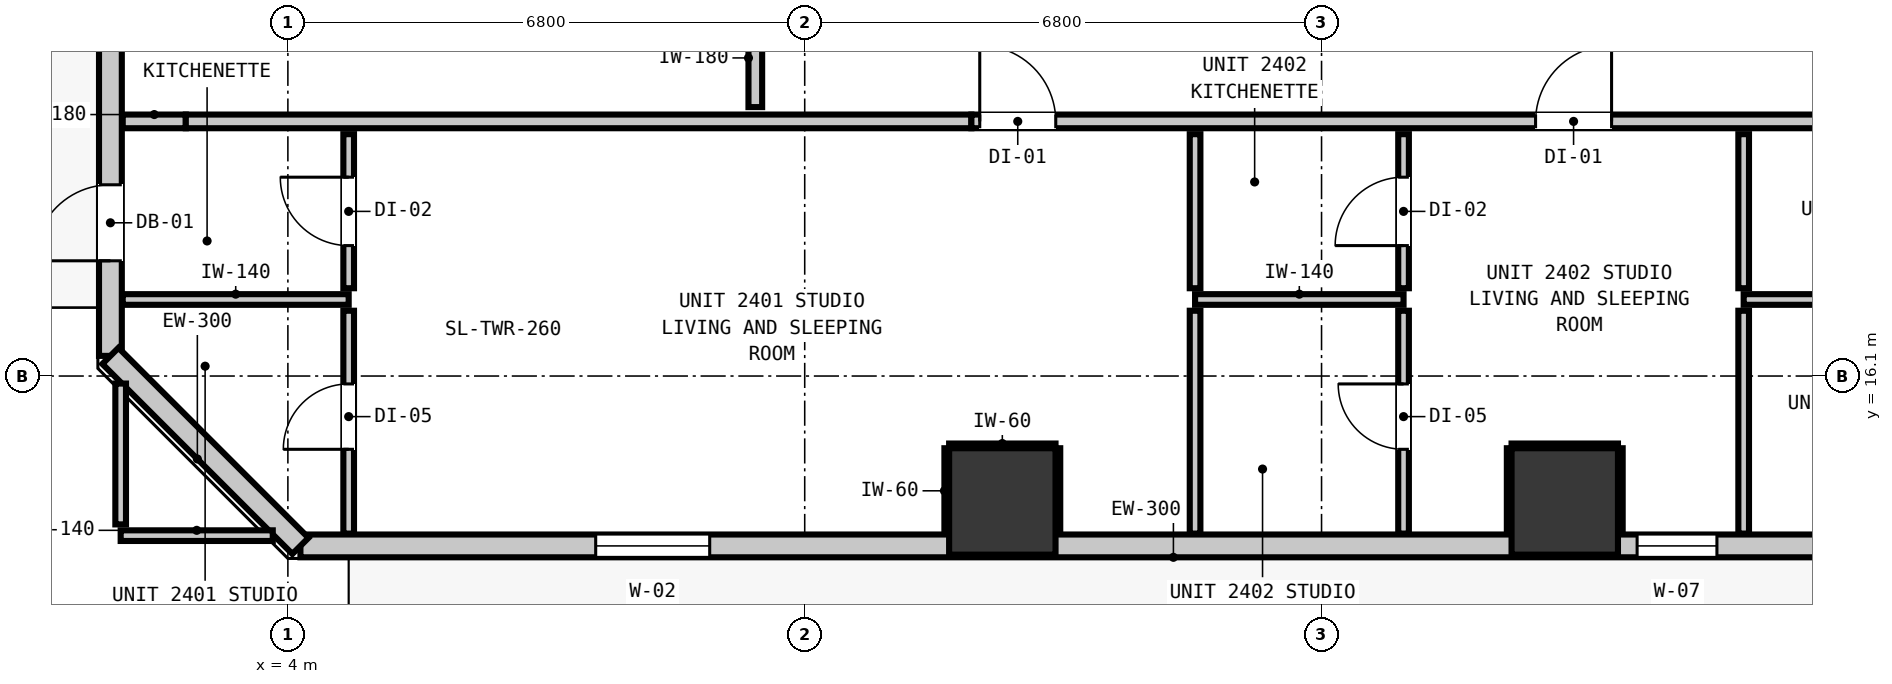
"""IFC4 building model, lengths in metres.
Left out: names, types, materials, properties, quantities, classifications, styles, units other than length and angle.
Written with IfcOpenShell. Run it as: python <this file> out.ifc"""

import sys

from ifc_helpers import new_model, si_unit, direction, frame, frame_2d, origin, origin_2d, place, context, subcontext, project, spatial, rectangle, extrude, element, fill, save


model = new_model("IFC4")
c1 = context("Model", 3, precision=1e-05, world=origin(), true_north=direction((0.0, 1.0)))
c2 = subcontext(c1, "Body", "Model", "MODEL_VIEW")
j1 = project(units=[si_unit("LENGTHUNIT", "METRE"), si_unit("PLANEANGLEUNIT", "RADIAN")], contexts=[c1])
p1 = place(None, origin())
s1 = spatial("IfcSite", under=j1, at=p1, CompositionType="ELEMENT")
p2 = place(p1, origin())
s2 = spatial("IfcBuilding", under=s1, at=p2, CompositionType="ELEMENT")
p3 = place(p2, frame((0.0, 0.0, 85.08)))
s3 = spatial("IfcBuildingStorey", under=s2, at=p3, CompositionType="ELEMENT", Elevation=85.08)
for number, where, z_axis, x_axis in (
    (1, (13.4, 14.45, 0.0), (0.0, 0.0, 1.0), (1.0, 0.0, 0.0)),
    (2, (20.8, 14.45, 0.0), (0.0, 0.0, 1.0), (1.0, 0.0, 0.0)),
):
    element("IfcColumn", number, at=place(p3, frame(where, z_axis=z_axis, x_axis=x_axis)), inside=s3, PredefinedType="COLUMN", context=c2, shape_type="SweptSolid", body=[
        extrude(rectangle(XDim=1.4, YDim=1.4, at=origin_2d()), origin(), (0.0, 0.0, 1.0), 3.32),
    ])
p4 = place(p3, frame((1.665, 16.365, 0.0), z_axis=(0.0, 0.0, 1.0), x_axis=(0.0, 1.0, 0.0)))
e3 = element("IfcWall", 3, at=p4, inside=s3, PredefinedType="STANDARD", context=c2, shape_type="SweptSolid", body=[
    extrude(rectangle(XDim=34.67, YDim=0.3, at=frame_2d((17.335, 0.0))), origin(), (0.0, 0.0, 1.0), 2.96),
])
p5 = place(p4, frame((1.251, 0.0, 0.0)))
e4 = element("IfcOpeningElement", 4, at=p5, cuts=e3, PredefinedType="OPENING", context=c2, shape_type="SweptSolid", body=[
    extrude(rectangle(XDim=1.0, YDim=2.15, at=frame_2d((0.5, 1.075))), frame((0.0, 0.16, 0.0), z_axis=(0.0, -1.0, 0.0), x_axis=(1.0, 0.0, 0.0)), (0.0, 0.0, 1.0), 0.32),
])
p6 = place(p4, frame((32.508, 0.0, 0.85)))
e5 = element("IfcOpeningElement", 5, at=p6, cuts=e3, PredefinedType="OPENING", context=c2, shape_type="SweptSolid", body=[
    extrude(rectangle(XDim=1.5, YDim=1.8, at=frame_2d((0.75, 0.9))), frame((0.0, 0.16, 0.0), z_axis=(0.0, -1.0, 0.0), x_axis=(1.0, 0.0, 0.0)), (0.0, 0.0, 1.0), 0.32),
])
p7 = place(p4, frame((8.323, 0.0, 0.85)))
e6 = element("IfcOpeningElement", 6, at=p7, cuts=e3, PredefinedType="OPENING", context=c2, shape_type="SweptSolid", body=[
    extrude(rectangle(XDim=1.5, YDim=1.8, at=frame_2d((0.75, 0.9))), frame((0.0, 0.16, 0.0), z_axis=(0.0, -1.0, 0.0), x_axis=(1.0, 0.0, 0.0)), (0.0, 0.0, 1.0), 0.32),
])
p8 = place(p4, frame((11.473, 0.0, 0.85)))
e7 = element("IfcOpeningElement", 7, at=p8, cuts=e3, PredefinedType="OPENING", context=c2, shape_type="SweptSolid", body=[
    extrude(rectangle(XDim=1.5, YDim=1.8, at=frame_2d((0.75, 0.9))), frame((0.0, 0.16, 0.0), z_axis=(0.0, -1.0, 0.0), x_axis=(1.0, 0.0, 0.0)), (0.0, 0.0, 1.0), 0.32),
])
p9 = place(p4, frame((17.857, 0.0, 0.85)))
e8 = element("IfcOpeningElement", 8, at=p9, cuts=e3, PredefinedType="OPENING", context=c2, shape_type="SweptSolid", body=[
    extrude(rectangle(XDim=1.5, YDim=1.8, at=frame_2d((0.75, 0.9))), frame((0.0, 0.16, 0.0), z_axis=(0.0, -1.0, 0.0), x_axis=(1.0, 0.0, 0.0)), (0.0, 0.0, 1.0), 0.32),
])
p10 = place(p4, frame((21.133, 0.0, 0.85)))
e9 = element("IfcOpeningElement", 9, at=p10, cuts=e3, PredefinedType="OPENING", context=c2, shape_type="SweptSolid", body=[
    extrude(rectangle(XDim=1.05, YDim=1.65, at=frame_2d((0.525, 0.825))), frame((0.0, 0.16, 0.0), z_axis=(0.0, -1.0, 0.0), x_axis=(1.0, 0.0, 0.0)), (0.0, 0.0, 1.0), 0.32),
])
p11 = place(p3, frame((41.635, 13.865, 0.0), z_axis=(0.0, 0.0, 1.0), x_axis=(-1.0, 0.0, 0.0)))
e10 = element("IfcWall", 10, at=p11, inside=s3, PredefinedType="STANDARD", context=c2, shape_type="SweptSolid", body=[
    extrude(rectangle(XDim=37.47, YDim=0.3, at=frame_2d((18.735, 0.0))), origin(), (0.0, 0.0, 1.0), 2.96),
])
p12 = place(p11, frame((1.251, 0.0, 0.0)))
e11 = element("IfcOpeningElement", 11, at=p12, cuts=e10, PredefinedType="OPENING", context=c2, shape_type="SweptSolid", body=[
    extrude(rectangle(XDim=1.0, YDim=2.15, at=frame_2d((0.5, 1.075))), frame((0.0, 0.16, 0.0), z_axis=(0.0, -1.0, 0.0), x_axis=(1.0, 0.0, 0.0)), (0.0, 0.0, 1.0), 0.32),
])
p13 = place(p11, frame((32.085, 0.0, 0.85)))
e12 = element("IfcOpeningElement", 12, at=p13, cuts=e10, PredefinedType="OPENING", context=c2, shape_type="SweptSolid", body=[
    extrude(rectangle(XDim=1.5, YDim=1.8, at=frame_2d((0.75, 0.9))), frame((0.0, 0.16, 0.0), z_axis=(0.0, -1.0, 0.0), x_axis=(1.0, 0.0, 0.0)), (0.0, 0.0, 1.0), 0.32),
])
p14 = place(p11, frame((18.833, 0.0, 0.85)))
e13 = element("IfcOpeningElement", 13, at=p14, cuts=e10, PredefinedType="OPENING", context=c2, shape_type="SweptSolid", body=[
    extrude(rectangle(XDim=1.05, YDim=1.65, at=frame_2d((0.525, 0.825))), frame((0.0, 0.16, 0.0), z_axis=(0.0, -1.0, 0.0), x_axis=(1.0, 0.0, 0.0)), (0.0, 0.0, 1.0), 0.32),
])
p15 = place(p11, frame((10.895, 0.0, 0.85)))
e14 = element("IfcOpeningElement", 14, at=p15, cuts=e10, PredefinedType="OPENING", context=c2, shape_type="SweptSolid", body=[
    extrude(rectangle(XDim=0.58, YDim=1.5, at=frame_2d((0.29, 0.75))), frame((0.0, 0.16, 0.0), z_axis=(0.0, -1.0, 0.0), x_axis=(1.0, 0.0, 0.0)), (0.0, 0.0, 1.0), 0.32),
])
p16 = place(p11, frame((15.283, 0.0, 0.85)))
e15 = element("IfcOpeningElement", 15, at=p16, cuts=e10, PredefinedType="OPENING", context=c2, shape_type="SweptSolid", body=[
    extrude(rectangle(XDim=1.5, YDim=1.8, at=frame_2d((0.75, 0.9))), frame((0.0, 0.16, 0.0), z_axis=(0.0, -1.0, 0.0), x_axis=(1.0, 0.0, 0.0)), (0.0, 0.0, 1.0), 0.32),
])
p17 = place(p11, frame((2.693, 0.0, 0.85)))
e16 = element("IfcOpeningElement", 16, at=p17, cuts=e10, PredefinedType="OPENING", context=c2, shape_type="SweptSolid", body=[
    extrude(rectangle(XDim=1.5, YDim=1.8, at=frame_2d((0.75, 0.9))), frame((0.0, 0.16, 0.0), z_axis=(0.0, -1.0, 0.0), x_axis=(1.0, 0.0, 0.0)), (0.0, 0.0, 1.0), 0.32),
])
p18 = place(p3, frame((4.165, 13.865, 0.0), z_axis=(0.0, 0.0, 1.0), x_axis=(-0.707106781187, 0.707106781187, 0.0)))
e17 = element("IfcWall", 17, at=p18, inside=s3, PredefinedType="STANDARD", context=c2, shape_type="SweptSolid", body=[
    extrude(rectangle(XDim=3.536, YDim=0.3, at=frame_2d((1.768, 0.0))), origin(), (0.0, 0.0, 1.0), 2.96),
])
p19 = place(p3, frame((1.827, 19.45, 0.0), z_axis=(0.0, 0.0, 1.0), x_axis=(1.0, 0.0, 0.0)))
e18 = element("IfcWall", 18, at=p19, inside=s3, PredefinedType="PARTITIONING", context=c2, shape_type="SweptSolid", body=[
    extrude(rectangle(XDim=0.83, YDim=0.18, at=frame_2d((0.415, 0.0))), origin(), (0.0, 0.0, 1.0), 2.96),
])
p20 = place(p3, frame((2.657, 19.45, 0.0), z_axis=(0.0, 0.0, 1.0), x_axis=(1.0, 0.0, 0.0)))
e19 = element("IfcWall", 19, at=p20, inside=s3, PredefinedType="PARTITIONING", context=c2, shape_type="SweptSolid", body=[
    extrude(rectangle(XDim=10.336, YDim=0.18, at=frame_2d((5.168, 0.0))), origin(), (0.0, 0.0, 1.0), 2.345),
])
p21 = place(p3, frame((12.993, 19.45, 0.0), z_axis=(0.0, 0.0, 1.0), x_axis=(1.0, 0.0, 0.0)))
e20 = element("IfcWall", 20, at=p21, inside=s3, PredefinedType="PARTITIONING", context=c2, shape_type="SweptSolid", body=[
    extrude(rectangle(XDim=30.98, YDim=0.18, at=frame_2d((15.49, 0.0))), origin(), (0.0, 0.0, 1.0), 2.96),
])
p22 = place(p21, frame((0.11, 0.0, 0.0)))
e21 = element("IfcOpeningElement", 21, at=p22, cuts=e20, PredefinedType="OPENING", context=c2, shape_type="SweptSolid", body=[
    extrude(rectangle(XDim=1.0, YDim=2.15, at=frame_2d((0.5, 1.075))), frame((0.0, 0.1, 0.0), z_axis=(0.0, -1.0, 0.0), x_axis=(1.0, 0.0, 0.0)), (0.0, 0.0, 1.0), 0.2),
])
p23 = place(p21, frame((7.423, 0.0, 0.0)))
e22 = element("IfcOpeningElement", 22, at=p23, cuts=e20, PredefinedType="OPENING", context=c2, shape_type="SweptSolid", body=[
    extrude(rectangle(XDim=1.0, YDim=2.15, at=frame_2d((0.5, 1.075))), frame((0.0, 0.1, 0.0), z_axis=(0.0, -1.0, 0.0), x_axis=(1.0, 0.0, 0.0)), (0.0, 0.0, 1.0), 0.2),
])
p24 = place(p21, frame((16.083, 0.0, 0.0)))
e23 = element("IfcOpeningElement", 23, at=p24, cuts=e20, PredefinedType="OPENING", context=c2, shape_type="SweptSolid", body=[
    extrude(rectangle(XDim=1.0, YDim=2.15, at=frame_2d((0.5, 1.075))), frame((0.0, 0.1, 0.0), z_axis=(0.0, -1.0, 0.0), x_axis=(1.0, 0.0, 0.0)), (0.0, 0.0, 1.0), 0.2),
])
p25 = place(p21, frame((24.027, 0.0, 0.0)))
e24 = element("IfcOpeningElement", 24, at=p25, cuts=e20, PredefinedType="OPENING", context=c2, shape_type="SweptSolid", body=[
    extrude(rectangle(XDim=1.0, YDim=2.15, at=frame_2d((0.5, 1.075))), frame((0.0, 0.1, 0.0), z_axis=(0.0, -1.0, 0.0), x_axis=(1.0, 0.0, 0.0)), (0.0, 0.0, 1.0), 0.2),
])
p26 = place(p3, frame((1.8, 14.0, 0.0), z_axis=(0.0, 0.0, 1.0), x_axis=(1.0, 0.0, 0.0)))
e25 = element("IfcWall", 25, at=p26, inside=s3, PredefinedType="PARTITIONING", context=c2, shape_type="SweptSolid", body=[
    extrude(rectangle(XDim=2.001, YDim=0.14, at=frame_2d((1.0, 0.0))), origin(), (0.0, 0.0, 1.0), 2.96),
])
p27 = place(p3, frame((1.827, 17.107, 0.0), z_axis=(0.0, 0.0, 1.0), x_axis=(1.0, 0.0, 0.0)))
e26 = element("IfcWall", 26, at=p27, inside=s3, PredefinedType="PARTITIONING", context=c2, shape_type="SweptSolid", body=[
    extrude(rectangle(XDim=2.973, YDim=0.14, at=frame_2d((1.487, 0.0))), origin(), (0.0, 0.0, 1.0), 2.96),
])
p28 = place(p3, frame((15.936, 17.107, 0.0), z_axis=(0.0, 0.0, 1.0), x_axis=(1.0, 0.0, 0.0)))
e27 = element("IfcWall", 27, at=p28, inside=s3, PredefinedType="PARTITIONING", context=c2, shape_type="SweptSolid", body=[
    extrude(rectangle(XDim=2.743, YDim=0.14, at=frame_2d((1.372, 0.0))), origin(), (0.0, 0.0, 1.0), 2.96),
])
p29 = place(p3, frame((23.154, 17.107, 0.0), z_axis=(0.0, 0.0, 1.0), x_axis=(1.0, 0.0, 0.0)))
e28 = element("IfcWall", 28, at=p29, inside=s3, PredefinedType="PARTITIONING", context=c2, shape_type="SweptSolid", body=[
    extrude(rectangle(XDim=4.896, YDim=0.14, at=frame_2d((2.448, 0.0))), origin(), (0.0, 0.0, 1.0), 2.96),
])
p30 = place(p3, frame((10.15, 19.638, 0.0), z_axis=(0.0, 0.0, 1.0), x_axis=(0.0, 1.0, 0.0)))
e29 = element("IfcWall", 29, at=p30, inside=s3, PredefinedType="PARTITIONING", context=c2, shape_type="SweptSolid", body=[
    extrude(rectangle(XDim=1.294, YDim=0.18, at=frame_2d((0.647, 0.0))), origin(), (0.0, 0.0, 1.0), 2.96),
])
p31 = place(p3, frame((1.8, 14.148, 0.0), z_axis=(0.0, 0.0, 1.0), x_axis=(0.0, 1.0, 0.0)))
e30 = element("IfcWall", 30, at=p31, inside=s3, PredefinedType="PARTITIONING", context=c2, shape_type="SweptSolid", body=[
    extrude(rectangle(XDim=1.853, YDim=0.14, at=frame_2d((0.927, 0.0))), origin(), (0.0, 0.0, 1.0), 2.96),
])
p32 = place(p3, frame((4.8, 14.027, 0.0), z_axis=(0.0, 0.0, 1.0), x_axis=(0.0, 1.0, 0.0)))
e31 = element("IfcWall", 31, at=p32, inside=s3, PredefinedType="PARTITIONING", context=c2, shape_type="SweptSolid", body=[
    extrude(rectangle(XDim=2.932, YDim=0.14, at=frame_2d((1.466, 0.0))), origin(), (0.0, 0.0, 1.0), 2.96),
])
p33 = place(p32, frame((1.109, 0.0, 0.0)))
e32 = element("IfcOpeningElement", 32, at=p33, cuts=e31, PredefinedType="OPENING", context=c2, shape_type="SweptSolid", body=[
    extrude(rectangle(XDim=0.86, YDim=2.02, at=frame_2d((0.43, 1.01))), frame((0.0, 0.08, 0.0), z_axis=(0.0, -1.0, 0.0), x_axis=(1.0, 0.0, 0.0)), (0.0, 0.0, 1.0), 0.16),
])
p34 = place(p3, frame((4.8, 17.255, 0.0), z_axis=(0.0, 0.0, 1.0), x_axis=(0.0, 1.0, 0.0)))
e33 = element("IfcWall", 33, at=p34, inside=s3, PredefinedType="PARTITIONING", context=c2, shape_type="SweptSolid", body=[
    extrude(rectangle(XDim=2.027, YDim=0.14, at=frame_2d((1.014, 0.0))), origin(), (0.0, 0.0, 1.0), 2.96),
])
p35 = place(p34, frame((0.561, 0.0, 0.0)))
e34 = element("IfcOpeningElement", 34, at=p35, cuts=e33, PredefinedType="OPENING", context=c2, shape_type="SweptSolid", body=[
    extrude(rectangle(XDim=0.9, YDim=2.1, at=frame_2d((0.45, 1.05))), frame((0.0, 0.08, 0.0), z_axis=(0.0, -1.0, 0.0), x_axis=(1.0, 0.0, 0.0)), (0.0, 0.0, 1.0), 0.16),
])
p36 = place(p3, frame((15.936, 14.027, 0.0), z_axis=(0.0, 0.0, 1.0), x_axis=(0.0, 1.0, 0.0)))
e35 = element("IfcWall", 35, at=p36, inside=s3, PredefinedType="PARTITIONING", context=c2, shape_type="SweptSolid", body=[
    extrude(rectangle(XDim=2.932, YDim=0.14, at=frame_2d((1.466, 0.0))), origin(), (0.0, 0.0, 1.0), 2.96),
])
p37 = place(p3, frame((15.936, 17.255, 0.0), z_axis=(0.0, 0.0, 1.0), x_axis=(0.0, 1.0, 0.0)))
e36 = element("IfcWall", 36, at=p37, inside=s3, PredefinedType="PARTITIONING", context=c2, shape_type="SweptSolid", body=[
    extrude(rectangle(XDim=2.027, YDim=0.14, at=frame_2d((1.014, 0.0))), origin(), (0.0, 0.0, 1.0), 2.96),
])
p38 = place(p3, frame((18.679, 14.027, 0.0), z_axis=(0.0, 0.0, 1.0), x_axis=(0.0, 1.0, 0.0)))
e37 = element("IfcWall", 37, at=p38, inside=s3, PredefinedType="PARTITIONING", context=c2, shape_type="SweptSolid", body=[
    extrude(rectangle(XDim=2.932, YDim=0.14, at=frame_2d((1.466, 0.0))), origin(), (0.0, 0.0, 1.0), 2.96),
])
p39 = place(p38, frame((1.109, 0.0, 0.0)))
e38 = element("IfcOpeningElement", 38, at=p39, cuts=e37, PredefinedType="OPENING", context=c2, shape_type="SweptSolid", body=[
    extrude(rectangle(XDim=0.86, YDim=2.02, at=frame_2d((0.43, 1.01))), frame((0.0, 0.08, 0.0), z_axis=(0.0, -1.0, 0.0), x_axis=(1.0, 0.0, 0.0)), (0.0, 0.0, 1.0), 0.16),
])
p40 = place(p3, frame((18.679, 17.255, 0.0), z_axis=(0.0, 0.0, 1.0), x_axis=(0.0, 1.0, 0.0)))
e39 = element("IfcWall", 39, at=p40, inside=s3, PredefinedType="PARTITIONING", context=c2, shape_type="SweptSolid", body=[
    extrude(rectangle(XDim=2.027, YDim=0.14, at=frame_2d((1.014, 0.0))), origin(), (0.0, 0.0, 1.0), 2.96),
])
p41 = place(p40, frame((0.561, 0.0, 0.0)))
e40 = element("IfcOpeningElement", 40, at=p41, cuts=e39, PredefinedType="OPENING", context=c2, shape_type="SweptSolid", body=[
    extrude(rectangle(XDim=0.9, YDim=2.1, at=frame_2d((0.45, 1.05))), frame((0.0, 0.08, 0.0), z_axis=(0.0, -1.0, 0.0), x_axis=(1.0, 0.0, 0.0)), (0.0, 0.0, 1.0), 0.16),
])
p42 = place(p3, frame((23.154, 14.027, 0.0), z_axis=(0.0, 0.0, 1.0), x_axis=(0.0, 1.0, 0.0)))
e41 = element("IfcWall", 41, at=p42, inside=s3, PredefinedType="PARTITIONING", context=c2, shape_type="SweptSolid", body=[
    extrude(rectangle(XDim=2.932, YDim=0.14, at=frame_2d((1.466, 0.0))), origin(), (0.0, 0.0, 1.0), 2.96),
])
p43 = place(p3, frame((23.154, 17.255, 0.0), z_axis=(0.0, 0.0, 1.0), x_axis=(0.0, 1.0, 0.0)))
e42 = element("IfcWall", 42, at=p43, inside=s3, PredefinedType="PARTITIONING", context=c2, shape_type="SweptSolid", body=[
    extrude(rectangle(XDim=2.027, YDim=0.14, at=frame_2d((1.014, 0.0))), origin(), (0.0, 0.0, 1.0), 2.96),
])
p44 = place(p3, frame((12.7, 15.182, 0.0), z_axis=(0.0, 0.0, 1.0), x_axis=(1.0, 0.0, 0.0)))
e43 = element("IfcWall", 43, at=p44, inside=s3, PredefinedType="PARTITIONING", context=c2, shape_type="SweptSolid", body=[
    extrude(rectangle(XDim=1.4, YDim=0.06, at=frame_2d((0.7, 0.0))), origin(), (0.0, 0.0, 1.0), 1.45),
])
for number, where, z_axis, x_axis in (
    (44, (12.668, 14.03, 0.0), (0.0, 0.0, 1.0), (0.0, 1.0, 0.0)),
    (45, (14.132, 14.03, 0.0), (0.0, 0.0, 1.0), (0.0, 1.0, 0.0)),
):
    element("IfcWall", number, at=place(p3, frame(where, z_axis=z_axis, x_axis=x_axis)), inside=s3, PredefinedType="PARTITIONING", context=c2, shape_type="SweptSolid", body=[
        extrude(rectangle(XDim=1.12, YDim=0.06, at=frame_2d((0.56, 0.0))), origin(), (0.0, 0.0, 1.0), 1.45),
    ])
p45 = place(p3, frame((20.1, 15.182, 0.0), z_axis=(0.0, 0.0, 1.0), x_axis=(1.0, 0.0, 0.0)))
e46 = element("IfcWall", 46, at=p45, inside=s3, PredefinedType="PARTITIONING", context=c2, shape_type="SweptSolid", body=[
    extrude(rectangle(XDim=1.4, YDim=0.06, at=frame_2d((0.7, 0.0))), origin(), (0.0, 0.0, 1.0), 1.45),
])
for number, where, z_axis, x_axis in (
    (47, (20.068, 14.03, 0.0), (0.0, 0.0, 1.0), (0.0, 1.0, 0.0)),
    (48, (21.532, 14.03, 0.0), (0.0, 0.0, 1.0), (0.0, 1.0, 0.0)),
):
    element("IfcWall", number, at=place(p3, frame(where, z_axis=z_axis, x_axis=x_axis)), inside=s3, PredefinedType="PARTITIONING", context=c2, shape_type="SweptSolid", body=[
        extrude(rectangle(XDim=1.12, YDim=0.06, at=frame_2d((0.56, 0.0))), origin(), (0.0, 0.0, 1.0), 1.45),
    ])
p46 = place(p5, origin())
e49 = element("IfcDoor", 49, at=p46, inside=s3, OperationType="SINGLE_SWING_LEFT", PredefinedType="DOOR", context=c2, shape_type="SweptSolid", body=[
    extrude(rectangle(XDim=1.0, YDim=2.15, at=frame_2d((0.5, 1.075))), frame((0.0, 0.025, 0.0), z_axis=(0.0, -1.0, 0.0), x_axis=(1.0, 0.0, 0.0)), (0.0, 0.0, 1.0), 0.05),
])
fill(e4, e49)
p47 = place(p13, origin())
e50 = element("IfcWindow", 50, at=p47, inside=s3, PartitioningType="SINGLE_PANEL", PredefinedType="WINDOW", context=c2, shape_type="SweptSolid", body=[
    extrude(rectangle(XDim=1.5, YDim=1.8, at=frame_2d((0.75, 0.9))), frame((0.0, 0.03, 0.0), z_axis=(0.0, -1.0, 0.0), x_axis=(1.0, 0.0, 0.0)), (0.0, 0.0, 1.0), 0.06),
])
fill(e12, e50)
p48 = place(p14, origin())
e51 = element("IfcWindow", 51, at=p48, inside=s3, PartitioningType="SINGLE_PANEL", PredefinedType="WINDOW", context=c2, shape_type="SweptSolid", body=[
    extrude(rectangle(XDim=1.05, YDim=1.65, at=frame_2d((0.525, 0.825))), frame((0.0, 0.03, 0.0), z_axis=(0.0, -1.0, 0.0), x_axis=(1.0, 0.0, 0.0)), (0.0, 0.0, 1.0), 0.06),
])
fill(e13, e51)
p49 = place(p22, origin())
e52 = element("IfcDoor", 52, at=p49, inside=s3, OperationType="SINGLE_SWING_LEFT", PredefinedType="DOOR", context=c2, shape_type="SweptSolid", body=[
    extrude(rectangle(XDim=1.0, YDim=2.15, at=frame_2d((0.5, 1.075))), frame((0.0, 0.025, 0.0), z_axis=(0.0, -1.0, 0.0), x_axis=(1.0, 0.0, 0.0)), (0.0, 0.0, 1.0), 0.05),
])
fill(e21, e52)
p50 = place(p35, origin())
e53 = element("IfcDoor", 53, at=p50, inside=s3, OperationType="SINGLE_SWING_RIGHT", PredefinedType="DOOR", context=c2, shape_type="SweptSolid", body=[
    extrude(rectangle(XDim=0.9, YDim=2.1, at=frame_2d((0.45, 1.05))), frame((0.0, 0.025, 0.0), z_axis=(0.0, -1.0, 0.0), x_axis=(1.0, 0.0, 0.0)), (0.0, 0.0, 1.0), 0.05),
])
fill(e34, e53)
p51 = place(p33, origin())
e54 = element("IfcDoor", 54, at=p51, inside=s3, OperationType="SINGLE_SWING_LEFT", PredefinedType="DOOR", context=c2, shape_type="SweptSolid", body=[
    extrude(rectangle(XDim=0.86, YDim=2.02, at=frame_2d((0.43, 1.01))), frame((0.0, 0.025, 0.0), z_axis=(0.0, -1.0, 0.0), x_axis=(1.0, 0.0, 0.0)), (0.0, 0.0, 1.0), 0.05),
])
fill(e32, e54)
p52 = place(p23, origin())
e55 = element("IfcDoor", 55, at=p52, inside=s3, OperationType="SINGLE_SWING_RIGHT", PredefinedType="DOOR", context=c2, shape_type="SweptSolid", body=[
    extrude(rectangle(XDim=1.0, YDim=2.15, at=frame_2d((0.5, 1.075))), frame((0.0, 0.025, 0.0), z_axis=(0.0, -1.0, 0.0), x_axis=(1.0, 0.0, 0.0)), (0.0, 0.0, 1.0), 0.05),
])
fill(e22, e55)
p53 = place(p41, origin())
e56 = element("IfcDoor", 56, at=p53, inside=s3, OperationType="SINGLE_SWING_LEFT", PredefinedType="DOOR", context=c2, shape_type="SweptSolid", body=[
    extrude(rectangle(XDim=0.9, YDim=2.1, at=frame_2d((0.45, 1.05))), frame((0.0, 0.025, 0.0), z_axis=(0.0, -1.0, 0.0), x_axis=(1.0, 0.0, 0.0)), (0.0, 0.0, 1.0), 0.05),
])
fill(e40, e56)
p54 = place(p39, origin())
e57 = element("IfcDoor", 57, at=p54, inside=s3, OperationType="SINGLE_SWING_RIGHT", PredefinedType="DOOR", context=c2, shape_type="SweptSolid", body=[
    extrude(rectangle(XDim=0.86, YDim=2.02, at=frame_2d((0.43, 1.01))), frame((0.0, 0.025, 0.0), z_axis=(0.0, -1.0, 0.0), x_axis=(1.0, 0.0, 0.0)), (0.0, 0.0, 1.0), 0.05),
])
fill(e38, e57)
save(model, sys.argv[1])
